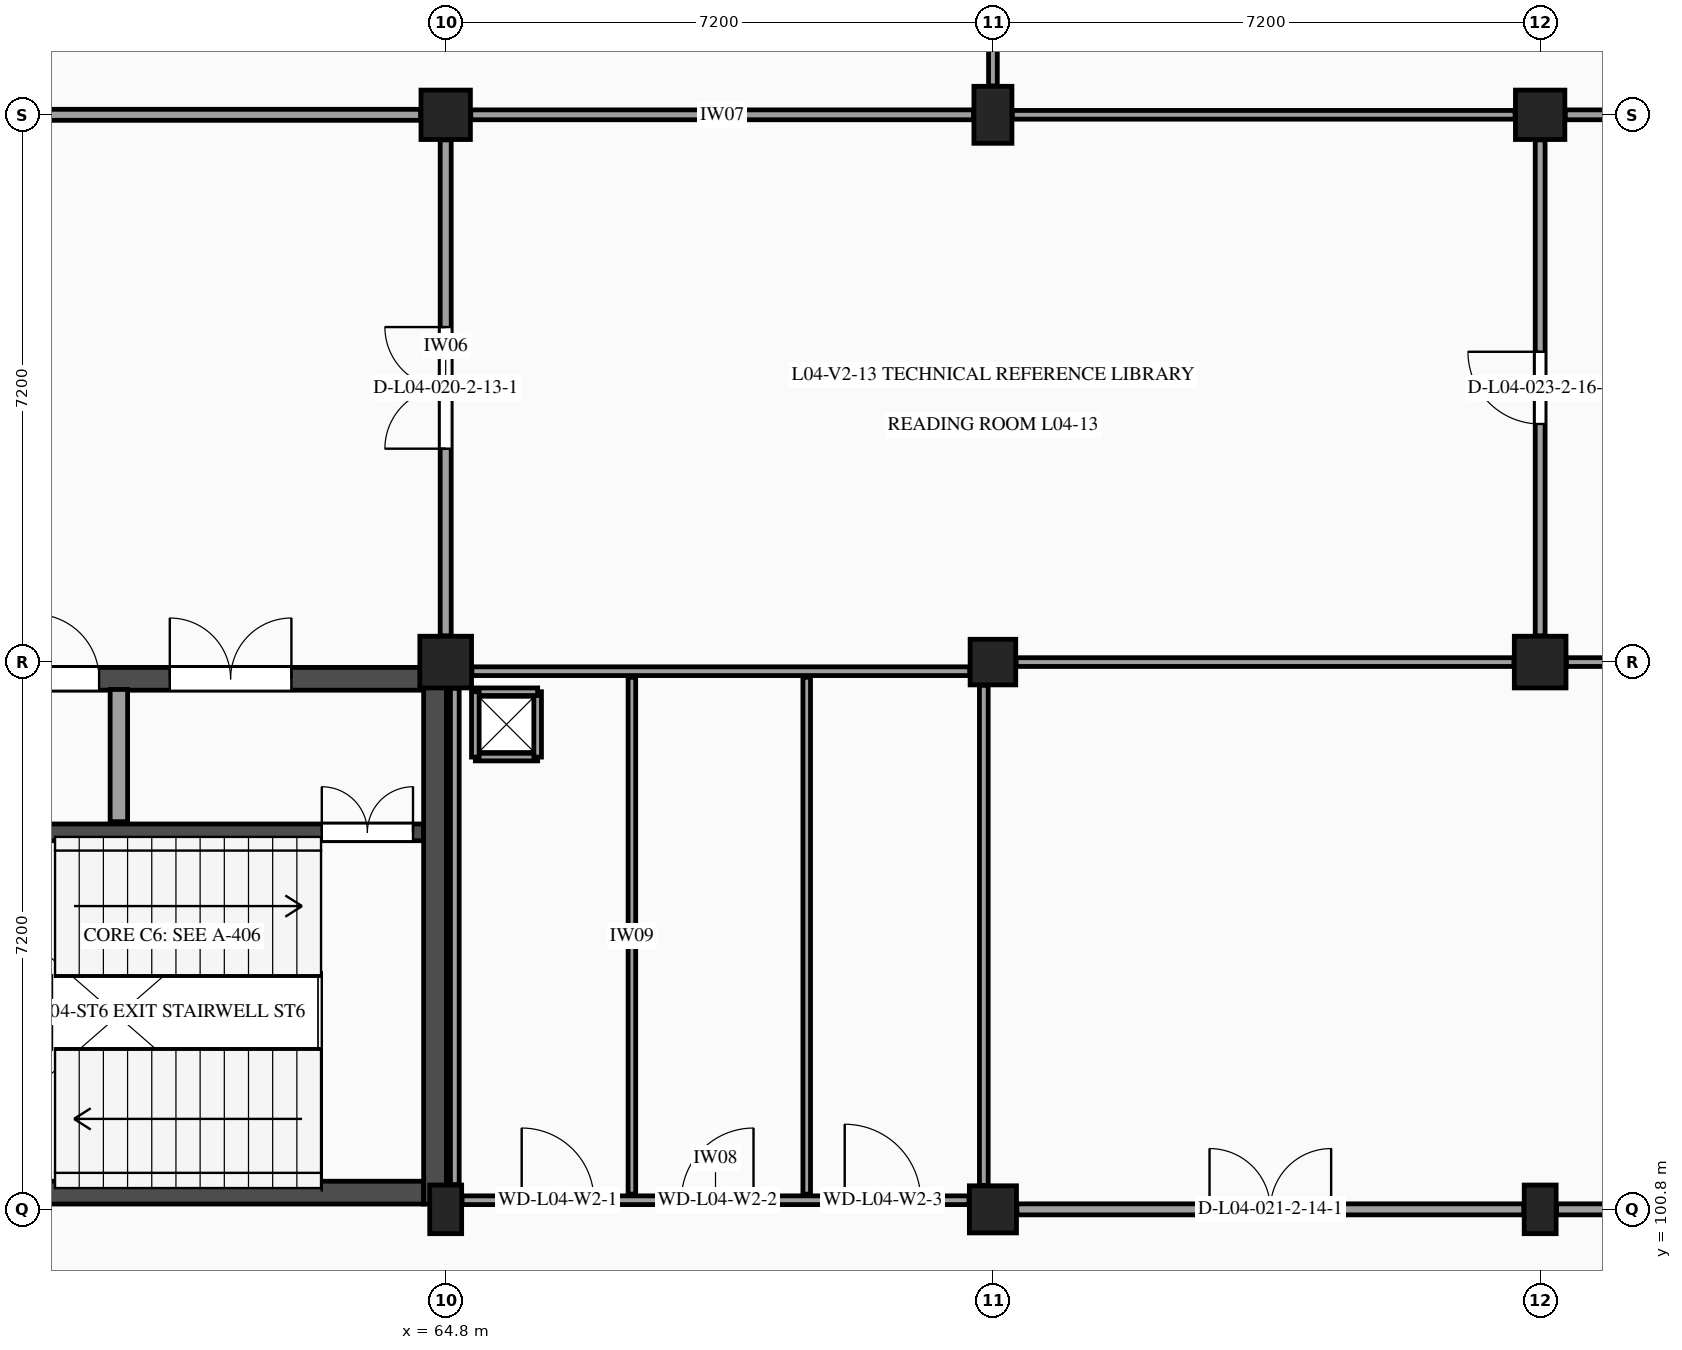
"""IFC4 building model, lengths in metres.
Left out: names, types, materials, properties, quantities, classifications, styles, units other than length and angle.
Written with IfcOpenShell. Run it as: python <this file> out.ifc"""

import sys

from ifc_helpers import new_model, si_unit, direction, frame, frame_2d, origin, origin_2d, place, context, subcontext, project, spatial, rectangle, extrude, element, fill, save


model = new_model("IFC4")
c1 = context("Model", 3, precision=1e-05, world=origin(), true_north=direction((0.0, 1.0)))
c2 = subcontext(c1, "Body", "Model", "MODEL_VIEW")
j1 = project(units=[si_unit("LENGTHUNIT", "METRE"), si_unit("PLANEANGLEUNIT", "RADIAN")], contexts=[c1])
p1 = place(None, origin())
s1 = spatial("IfcSite", under=j1, at=p1, CompositionType="ELEMENT")
p2 = place(p1, origin())
s2 = spatial("IfcBuilding", under=s1, at=p2, CompositionType="ELEMENT")
p3 = place(p2, frame((0.0, 0.0, 18.6)))
s3 = spatial("IfcBuildingStorey", under=s2, at=p3, CompositionType="ELEMENT", Elevation=18.6)
p4 = place(p3, frame((64.8, 100.8, 0.0), z_axis=(0.0, 0.0, 1.0), x_axis=(1.0, 0.0, 0.0)))
e1 = element("IfcColumn", 1, at=p4, inside=s3, PredefinedType="PILASTER", context=c2, shape_type="SweptSolid", body=[
    extrude(rectangle(XDim=0.42, YDim=0.64, at=origin_2d()), origin(), (0.0, 0.0, 1.0), 4.2),
])
p5 = place(p3, frame((64.8, 108.0, 0.0), z_axis=(0.0, 0.0, 1.0), x_axis=(1.0, 0.0, 0.0)))
e2 = element("IfcColumn", 2, at=p5, inside=s3, PredefinedType="COLUMN", context=c2, shape_type="SweptSolid", body=[
    extrude(rectangle(XDim=0.68, YDim=0.68, at=origin_2d()), origin(), (0.0, 0.0, 1.0), 4.2),
])
p6 = place(p3, frame((64.8, 115.2, 0.0), z_axis=(0.0, 0.0, 1.0), x_axis=(1.0, 0.0, 0.0)))
e3 = element("IfcColumn", 3, at=p6, inside=s3, PredefinedType="COLUMN", context=c2, shape_type="SweptSolid", body=[
    extrude(rectangle(XDim=0.65, YDim=0.65, at=origin_2d()), origin(), (0.0, 0.0, 1.0), 4.2),
])
p7 = place(p3, frame((72.0, 100.8, 0.0), z_axis=(0.0, 0.0, 1.0), x_axis=(1.0, 0.0, 0.0)))
e4 = element("IfcColumn", 4, at=p7, inside=s3, PredefinedType="COLUMN", context=c2, shape_type="SweptSolid", body=[
    extrude(rectangle(XDim=0.62, YDim=0.62, at=origin_2d()), origin(), (0.0, 0.0, 1.0), 4.2),
])
p8 = place(p3, frame((72.0, 108.0, 0.0), z_axis=(0.0, 0.0, 1.0), x_axis=(1.0, 0.0, 0.0)))
e5 = element("IfcColumn", 5, at=p8, inside=s3, PredefinedType="COLUMN", context=c2, shape_type="SweptSolid", body=[
    extrude(rectangle(XDim=0.6, YDim=0.6, at=origin_2d()), origin(), (0.0, 0.0, 1.0), 4.2),
])
p9 = place(p3, frame((72.0, 115.2, 0.0), z_axis=(0.0, 0.0, 1.0), x_axis=(1.0, 0.0, 0.0)))
e6 = element("IfcColumn", 6, at=p9, inside=s3, PredefinedType="COLUMN", context=c2, shape_type="SweptSolid", body=[
    extrude(rectangle(XDim=0.5, YDim=0.75, at=origin_2d()), origin(), (0.0, 0.0, 1.0), 4.2),
])
p10 = place(p3, frame((79.2, 100.8, 0.0), z_axis=(0.0, 0.0, 1.0), x_axis=(1.0, 0.0, 0.0)))
e7 = element("IfcColumn", 7, at=p10, inside=s3, PredefinedType="PILASTER", context=c2, shape_type="SweptSolid", body=[
    extrude(rectangle(XDim=0.42, YDim=0.64, at=origin_2d()), origin(), (0.0, 0.0, 1.0), 4.2),
])
p11 = place(p3, frame((79.2, 108.0, 0.0), z_axis=(0.0, 0.0, 1.0), x_axis=(1.0, 0.0, 0.0)))
e8 = element("IfcColumn", 8, at=p11, inside=s3, PredefinedType="COLUMN", context=c2, shape_type="SweptSolid", body=[
    extrude(rectangle(XDim=0.68, YDim=0.68, at=origin_2d()), origin(), (0.0, 0.0, 1.0), 4.2),
])
p12 = place(p3, frame((79.2, 115.2, 0.0), z_axis=(0.0, 0.0, 1.0), x_axis=(1.0, 0.0, 0.0)))
e9 = element("IfcColumn", 9, at=p12, inside=s3, PredefinedType="COLUMN", context=c2, shape_type="SweptSolid", body=[
    extrude(rectangle(XDim=0.65, YDim=0.65, at=origin_2d()), origin(), (0.0, 0.0, 1.0), 4.2),
])
p13 = place(p3, frame((57.97, 101.02, 0.0), z_axis=(0.0, 0.0, 1.0), x_axis=(1.0, 0.0, 0.0)))
e10 = element("IfcWall", 10, at=p13, inside=s3, PredefinedType="SHEAR", context=c2, shape_type="SweptSolid", body=[
    extrude(rectangle(XDim=6.54, YDim=0.3, at=frame_2d((3.27, 0.0))), origin(), (0.0, 0.0, 1.0), 3.955),
])
p14 = place(p3, frame((57.97, 107.78, 0.0), z_axis=(0.0, 0.0, 1.0), x_axis=(1.0, 0.0, 0.0)))
e11 = element("IfcWall", 11, at=p14, inside=s3, PredefinedType="SHEAR", context=c2, shape_type="SweptSolid", body=[
    extrude(rectangle(XDim=6.54, YDim=0.3, at=frame_2d((3.27, 0.0))), origin(), (0.0, 0.0, 1.0), 3.955),
])
p15 = place(p14, frame((1.42, 0.0, 0.0)))
e12 = element("IfcOpeningElement", 12, at=p15, cuts=e11, PredefinedType="OPENING", context=c2, shape_type="SweptSolid", body=[
    extrude(rectangle(XDim=0.85, YDim=2.1, at=frame_2d((0.425, 1.05))), frame((0.0, 0.16, 0.0), z_axis=(0.0, -1.0, 0.0), x_axis=(1.0, 0.0, 0.0)), (0.0, 0.0, 1.0), 0.32),
])
p16 = place(p14, frame((3.2, 0.0, 0.0)))
e13 = element("IfcOpeningElement", 13, at=p16, cuts=e11, PredefinedType="OPENING", context=c2, shape_type="SweptSolid", body=[
    extrude(rectangle(XDim=1.6, YDim=2.2, at=frame_2d((0.8, 1.1))), frame((0.0, 0.16, 0.0), z_axis=(0.0, -1.0, 0.0), x_axis=(1.0, 0.0, 0.0)), (0.0, 0.0, 1.0), 0.32),
])
p17 = place(p3, frame((57.97, 105.76, 0.0), z_axis=(0.0, 0.0, 1.0), x_axis=(1.0, 0.0, 0.0)))
e14 = element("IfcWall", 14, at=p17, inside=s3, PredefinedType="SHEAR", context=c2, shape_type="SweptSolid", body=[
    extrude(rectangle(XDim=6.54, YDim=0.22, at=frame_2d((3.27, 0.0))), origin(), (0.0, 0.0, 1.0), 3.955),
])
p18 = place(p17, frame((5.2, 0.0, 0.0)))
e15 = element("IfcOpeningElement", 15, at=p18, cuts=e14, PredefinedType="OPENING", context=c2, shape_type="SweptSolid", body=[
    extrude(rectangle(XDim=1.2, YDim=2.2, at=frame_2d((0.6, 1.1))), frame((0.0, 0.12, 0.0), z_axis=(0.0, -1.0, 0.0), x_axis=(1.0, 0.0, 0.0)), (0.0, 0.0, 1.0), 0.24),
])
p19 = place(p3, frame((60.5, 105.9, 0.0), z_axis=(0.0, 0.0, 1.0), x_axis=(0.0, 1.0, 0.0)))
e16 = element("IfcWall", 16, at=p19, inside=s3, PredefinedType="PARTITIONING", context=c2, shape_type="SweptSolid", body=[
    extrude(rectangle(XDim=1.74, YDim=0.23, at=frame_2d((0.87, 0.0))), origin(), (0.0, 0.0, 1.0), 3.955),
])
p20 = place(p3, frame((64.66, 100.87, 0.0), z_axis=(0.0, 0.0, 1.0), x_axis=(0.0, 1.0, 0.0)))
e17 = element("IfcWall", 17, at=p20, inside=s3, PredefinedType="SHEAR", context=c2, shape_type="SweptSolid", body=[
    extrude(rectangle(XDim=7.06, YDim=0.3, at=frame_2d((3.53, 0.0))), origin(), (0.0, 0.0, 1.0), 3.955),
])
p21 = place(p3, frame((65.015, 100.92, 0.0), z_axis=(0.0, 0.0, 1.0), x_axis=(1.0, 0.0, 0.0)))
e18 = element("IfcWall", 18, at=p21, inside=s3, PredefinedType="PARTITIONING", context=c2, shape_type="SweptSolid", body=[
    extrude(rectangle(XDim=6.67, YDim=0.115, at=frame_2d((3.335, 0.0))), origin(), (0.0, 0.0, 1.0), 3.23),
])
p22 = place(p21, frame((0.785, 0.0, 0.0)))
e19 = element("IfcOpeningElement", 19, at=p22, cuts=e18, PredefinedType="OPENING", context=c2, shape_type="SweptSolid", body=[
    extrude(rectangle(XDim=0.95, YDim=2.1, at=frame_2d((0.475, 1.05))), frame((0.0, 0.067, 0.0), z_axis=(0.0, -1.0, 0.0), x_axis=(1.0, 0.0, 0.0)), (0.0, 0.0, 1.0), 0.135),
])
p23 = place(p21, frame((2.885, 0.0, 0.0)))
e20 = element("IfcOpeningElement", 20, at=p23, cuts=e18, PredefinedType="OPENING", context=c2, shape_type="SweptSolid", body=[
    extrude(rectangle(XDim=0.95, YDim=2.1, at=frame_2d((0.475, 1.05))), frame((0.0, 0.067, 0.0), z_axis=(0.0, -1.0, 0.0), x_axis=(1.0, 0.0, 0.0)), (0.0, 0.0, 1.0), 0.135),
])
p24 = place(p21, frame((5.035, 0.0, 0.0)))
e21 = element("IfcOpeningElement", 21, at=p24, cuts=e18, PredefinedType="OPENING", context=c2, shape_type="SweptSolid", body=[
    extrude(rectangle(XDim=1.0, YDim=2.15, at=frame_2d((0.5, 1.075))), frame((0.0, 0.067, 0.0), z_axis=(0.0, -1.0, 0.0), x_axis=(1.0, 0.0, 0.0)), (0.0, 0.0, 1.0), 0.135),
])
p25 = place(p3, frame((65.145, 107.88, 0.0), z_axis=(0.0, 0.0, 1.0), x_axis=(1.0, 0.0, 0.0)))
e22 = element("IfcWall", 22, at=p25, inside=s3, PredefinedType="PARTITIONING", context=c2, shape_type="SweptSolid", body=[
    extrude(rectangle(XDim=6.55, YDim=0.115, at=frame_2d((3.275, 0.0))), origin(), (0.0, 0.0, 1.0), 3.23),
])
p26 = place(p3, frame((64.92, 101.125, 0.0), z_axis=(0.0, 0.0, 1.0), x_axis=(0.0, 1.0, 0.0)))
e23 = element("IfcWall", 23, at=p26, inside=s3, PredefinedType="PARTITIONING", context=c2, shape_type="SweptSolid", body=[
    extrude(rectangle(XDim=6.53, YDim=0.115, at=frame_2d((3.265, 0.0))), origin(), (0.0, 0.0, 1.0), 3.26),
])
p27 = place(p3, frame((71.88, 101.115, 0.0), z_axis=(0.0, 0.0, 1.0), x_axis=(0.0, 1.0, 0.0)))
e24 = element("IfcWall", 24, at=p27, inside=s3, PredefinedType="PARTITIONING", context=c2, shape_type="SweptSolid", body=[
    extrude(rectangle(XDim=6.58, YDim=0.115, at=frame_2d((3.29, 0.0))), origin(), (0.0, 0.0, 1.0), 3.24),
])
for number, where, z_axis, x_axis in (
    (25, (67.25, 101.0, 0.0), (0.0, 0.0, 1.0), (0.0, 1.0, 0.0)),
    (26, (69.55, 101.0, 0.0), (0.0, 0.0, 1.0), (0.0, 1.0, 0.0)),
):
    element("IfcWall", number, at=place(p3, frame(where, z_axis=z_axis, x_axis=x_axis)), inside=s3, PredefinedType="PARTITIONING", context=c2, shape_type="SweptSolid", body=[
        extrude(rectangle(XDim=6.8, YDim=0.1, at=frame_2d((3.4, 0.0))), origin(), (0.0, 0.0, 1.0), 3.955),
    ])
p28 = place(p3, frame((65.19, 106.75, 0.0), z_axis=(0.0, 0.0, 1.0), x_axis=(1.0, 0.0, 0.0)))
e27 = element("IfcWall", 27, at=p28, inside=s3, PredefinedType="PARTITIONING", context=c2, shape_type="SweptSolid", body=[
    extrude(rectangle(XDim=0.82, YDim=0.1, at=frame_2d((0.41, 0.0))), origin(), (0.0, 0.0, 1.0), 3.955),
])
p29 = place(p3, frame((66.01, 106.75, 0.0), z_axis=(0.0, 0.0, 1.0), x_axis=(0.0, 1.0, 0.0)))
e28 = element("IfcWall", 28, at=p29, inside=s3, PredefinedType="PARTITIONING", context=c2, shape_type="SweptSolid", body=[
    extrude(rectangle(XDim=0.86, YDim=0.1, at=frame_2d((0.43, 0.0))), origin(), (0.0, 0.0, 1.0), 3.955),
])
p30 = place(p3, frame((66.01, 107.61, 0.0), z_axis=(0.0, 0.0, 1.0), x_axis=(-1.0, 0.0, 0.0)))
e29 = element("IfcWall", 29, at=p30, inside=s3, PredefinedType="PARTITIONING", context=c2, shape_type="SweptSolid", body=[
    extrude(rectangle(XDim=0.82, YDim=0.1, at=frame_2d((0.41, 0.0))), origin(), (0.0, 0.0, 1.0), 3.955),
])
p31 = place(p3, frame((65.19, 107.61, 0.0), z_axis=(0.0, 0.0, 1.0), x_axis=(0.0, -1.0, 0.0)))
e30 = element("IfcWall", 30, at=p31, inside=s3, PredefinedType="PARTITIONING", context=c2, shape_type="SweptSolid", body=[
    extrude(rectangle(XDim=0.86, YDim=0.1, at=frame_2d((0.43, 0.0))), origin(), (0.0, 0.0, 1.0), 3.955),
])
p32 = place(p3, frame((64.8, 108.345, 0.0), z_axis=(0.0, 0.0, 1.0), x_axis=(0.0, 1.0, 0.0)))
e31 = element("IfcWall", 31, at=p32, inside=s3, PredefinedType="PARTITIONING", context=c2, shape_type="SweptSolid", body=[
    extrude(rectangle(XDim=6.525, YDim=0.145, at=frame_2d((3.263, 0.0))), origin(), (0.0, 0.0, 1.0), 3.26),
])
p33 = place(p32, frame((2.462, 0.0, 0.0)))
e32 = element("IfcOpeningElement", 32, at=p33, cuts=e31, PredefinedType="OPENING", context=c2, shape_type="SweptSolid", body=[
    extrude(rectangle(XDim=1.6, YDim=2.2, at=frame_2d((0.8, 1.1))), frame((0.0, 0.083, 0.0), z_axis=(0.0, -1.0, 0.0), x_axis=(1.0, 0.0, 0.0)), (0.0, 0.0, 1.0), 0.165),
])
p34 = place(p3, frame((57.855, 115.2, 0.0), z_axis=(0.0, 0.0, 1.0), x_axis=(1.0, 0.0, 0.0)))
e33 = element("IfcWall", 33, at=p34, inside=s3, PredefinedType="PARTITIONING", context=c2, shape_type="SweptSolid", body=[
    extrude(rectangle(XDim=6.615, YDim=0.145, at=frame_2d((3.308, 0.0))), origin(), (0.0, 0.0, 1.0), 3.215),
])
p35 = place(p3, frame((65.13, 115.2, 0.0), z_axis=(0.0, 0.0, 1.0), x_axis=(1.0, 0.0, 0.0)))
e34 = element("IfcWall", 34, at=p35, inside=s3, PredefinedType="PARTITIONING", context=c2, shape_type="SweptSolid", body=[
    extrude(rectangle(XDim=6.615, YDim=0.13, at=frame_2d((3.308, 0.0))), origin(), (0.0, 0.0, 1.0), 3.23),
])
p36 = place(p3, frame((72.0, 115.58, 0.0), z_axis=(0.0, 0.0, 1.0), x_axis=(0.0, 1.0, 0.0)))
e35 = element("IfcWall", 35, at=p36, inside=s3, PredefinedType="PARTITIONING", context=c2, shape_type="SweptSolid", body=[
    extrude(rectangle(XDim=6.495, YDim=0.115, at=frame_2d((3.248, 0.0))), origin(), (0.0, 0.0, 1.0), 3.305),
])
p37 = place(p36, frame((2.448, 0.0, 0.0)))
e36 = element("IfcOpeningElement", 36, at=p37, cuts=e35, PredefinedType="OPENING", context=c2, shape_type="SweptSolid", body=[
    extrude(rectangle(XDim=1.6, YDim=2.2, at=frame_2d((0.8, 1.1))), frame((0.0, 0.067, 0.0), z_axis=(0.0, -1.0, 0.0), x_axis=(1.0, 0.0, 0.0)), (0.0, 0.0, 1.0), 0.135),
])
p38 = place(p3, frame((72.315, 100.8, 0.0), z_axis=(0.0, 0.0, 1.0), x_axis=(1.0, 0.0, 0.0)))
e37 = element("IfcWall", 37, at=p38, inside=s3, PredefinedType="PARTITIONING", context=c2, shape_type="SweptSolid", body=[
    extrude(rectangle(XDim=6.67, YDim=0.145, at=frame_2d((3.335, 0.0))), origin(), (0.0, 0.0, 1.0), 3.215),
])
p39 = place(p38, frame((2.535, 0.0, 0.0)))
e38 = element("IfcOpeningElement", 38, at=p39, cuts=e37, PredefinedType="OPENING", context=c2, shape_type="SweptSolid", body=[
    extrude(rectangle(XDim=1.6, YDim=2.2, at=frame_2d((0.8, 1.1))), frame((0.0, 0.083, 0.0), z_axis=(0.0, -1.0, 0.0), x_axis=(1.0, 0.0, 0.0)), (0.0, 0.0, 1.0), 0.165),
])
p40 = place(p3, frame((72.305, 108.0, 0.0), z_axis=(0.0, 0.0, 1.0), x_axis=(1.0, 0.0, 0.0)))
e39 = element("IfcWall", 39, at=p40, inside=s3, PredefinedType="PARTITIONING", context=c2, shape_type="SweptSolid", body=[
    extrude(rectangle(XDim=6.55, YDim=0.115, at=frame_2d((3.275, 0.0))), origin(), (0.0, 0.0, 1.0), 3.215),
])
p41 = place(p3, frame((79.2, 108.345, 0.0), z_axis=(0.0, 0.0, 1.0), x_axis=(0.0, 1.0, 0.0)))
e40 = element("IfcWall", 40, at=p41, inside=s3, PredefinedType="PARTITIONING", context=c2, shape_type="SweptSolid", body=[
    extrude(rectangle(XDim=6.525, YDim=0.13, at=frame_2d((3.263, 0.0))), origin(), (0.0, 0.0, 1.0), 3.24),
])
p42 = place(p41, frame((2.788, 0.0, 0.0)))
e41 = element("IfcOpeningElement", 41, at=p42, cuts=e40, PredefinedType="OPENING", context=c2, shape_type="SweptSolid", body=[
    extrude(rectangle(XDim=0.95, YDim=2.15, at=frame_2d((0.475, 1.075))), frame((0.0, 0.075, 0.0), z_axis=(0.0, -1.0, 0.0), x_axis=(1.0, 0.0, 0.0)), (0.0, 0.0, 1.0), 0.15),
])
p43 = place(p3, frame((72.255, 115.2, 0.0), z_axis=(0.0, 0.0, 1.0), x_axis=(1.0, 0.0, 0.0)))
e42 = element("IfcWall", 42, at=p43, inside=s3, PredefinedType="PARTITIONING", context=c2, shape_type="SweptSolid", body=[
    extrude(rectangle(XDim=6.615, YDim=0.115, at=frame_2d((3.308, 0.0))), origin(), (0.0, 0.0, 1.0), 3.215),
])
p44 = place(p3, frame((79.415, 100.8, 0.0), z_axis=(0.0, 0.0, 1.0), x_axis=(1.0, 0.0, 0.0)))
e43 = element("IfcWall", 43, at=p44, inside=s3, PredefinedType="PARTITIONING", context=c2, shape_type="SweptSolid", body=[
    extrude(rectangle(XDim=6.67, YDim=0.145, at=frame_2d((3.335, 0.0))), origin(), (0.0, 0.0, 1.0), 3.235),
])
p45 = place(p3, frame((79.545, 108.0, 0.0), z_axis=(0.0, 0.0, 1.0), x_axis=(1.0, 0.0, 0.0)))
e44 = element("IfcWall", 44, at=p45, inside=s3, PredefinedType="PARTITIONING", context=c2, shape_type="SweptSolid", body=[
    extrude(rectangle(XDim=6.55, YDim=0.115, at=frame_2d((3.275, 0.0))), origin(), (0.0, 0.0, 1.0), 3.235),
])
p46 = place(p3, frame((79.53, 115.2, 0.0), z_axis=(0.0, 0.0, 1.0), x_axis=(1.0, 0.0, 0.0)))
e45 = element("IfcWall", 45, at=p46, inside=s3, PredefinedType="PARTITIONING", context=c2, shape_type="SweptSolid", body=[
    extrude(rectangle(XDim=6.615, YDim=0.13, at=frame_2d((3.308, 0.0))), origin(), (0.0, 0.0, 1.0), 3.235),
])
p47 = place(p15, origin())
e46 = element("IfcDoor", 46, at=p47, inside=s3, OperationType="SINGLE_SWING_LEFT", PredefinedType="DOOR", context=c2, shape_type="SweptSolid", body=[
    extrude(rectangle(XDim=0.85, YDim=2.1, at=frame_2d((0.425, 1.05))), frame((0.0, 0.025, 0.0), z_axis=(0.0, -1.0, 0.0), x_axis=(1.0, 0.0, 0.0)), (0.0, 0.0, 1.0), 0.05),
])
fill(e12, e46)
p48 = place(p18, origin())
e47 = element("IfcDoor", 47, at=p48, inside=s3, OperationType="DOUBLE_DOOR_SINGLE_SWING", PredefinedType="DOOR", context=c2, shape_type="SweptSolid", body=[
    extrude(rectangle(XDim=1.2, YDim=2.2, at=frame_2d((0.6, 1.1))), frame((0.0, 0.025, 0.0), z_axis=(0.0, -1.0, 0.0), x_axis=(1.0, 0.0, 0.0)), (0.0, 0.0, 1.0), 0.05),
])
fill(e15, e47)
p49 = place(p16, frame((1.6, 0.0, 0.0), z_axis=(0.0, 0.0, 1.0), x_axis=(-1.0, 0.0, 0.0)))
e48 = element("IfcDoor", 48, at=p49, inside=s3, OperationType="DOUBLE_DOOR_SINGLE_SWING", PredefinedType="DOOR", context=c2, shape_type="SweptSolid", body=[
    extrude(rectangle(XDim=1.6, YDim=2.2, at=frame_2d((0.8, 1.1))), frame((0.0, 0.025, 0.0), z_axis=(0.0, -1.0, 0.0), x_axis=(1.0, 0.0, 0.0)), (0.0, 0.0, 1.0), 0.05),
])
fill(e13, e48)
p50 = place(p22, origin())
e49 = element("IfcDoor", 49, at=p50, inside=s3, OperationType="SINGLE_SWING_LEFT", PredefinedType="DOOR", context=c2, shape_type="SweptSolid", body=[
    extrude(rectangle(XDim=0.95, YDim=2.1, at=frame_2d((0.475, 1.05))), frame((0.0, 0.025, 0.0), z_axis=(0.0, -1.0, 0.0), x_axis=(1.0, 0.0, 0.0)), (0.0, 0.0, 1.0), 0.05),
])
fill(e19, e49)
p51 = place(p23, origin())
e50 = element("IfcDoor", 50, at=p51, inside=s3, OperationType="SINGLE_SWING_RIGHT", PredefinedType="DOOR", context=c2, shape_type="SweptSolid", body=[
    extrude(rectangle(XDim=0.95, YDim=2.1, at=frame_2d((0.475, 1.05))), frame((0.0, 0.025, 0.0), z_axis=(0.0, -1.0, 0.0), x_axis=(1.0, 0.0, 0.0)), (0.0, 0.0, 1.0), 0.05),
])
fill(e20, e50)
p52 = place(p24, origin())
e51 = element("IfcDoor", 51, at=p52, inside=s3, OperationType="SINGLE_SWING_LEFT", PredefinedType="DOOR", context=c2, shape_type="SweptSolid", body=[
    extrude(rectangle(XDim=1.0, YDim=2.15, at=frame_2d((0.5, 1.075))), frame((0.0, 0.025, 0.0), z_axis=(0.0, -1.0, 0.0), x_axis=(1.0, 0.0, 0.0)), (0.0, 0.0, 1.0), 0.05),
])
fill(e21, e51)
p53 = place(p33, origin())
e52 = element("IfcDoor", 52, at=p53, inside=s3, OperationType="DOUBLE_DOOR_SINGLE_SWING", PredefinedType="DOOR", context=c2, shape_type="SweptSolid", body=[
    extrude(rectangle(XDim=1.6, YDim=2.2, at=frame_2d((0.8, 1.1))), frame((0.0, 0.025, 0.0), z_axis=(0.0, -1.0, 0.0), x_axis=(1.0, 0.0, 0.0)), (0.0, 0.0, 1.0), 0.05),
])
fill(e32, e52)
p54 = place(p39, origin())
e53 = element("IfcDoor", 53, at=p54, inside=s3, OperationType="DOUBLE_DOOR_SINGLE_SWING", PredefinedType="DOOR", context=c2, shape_type="SweptSolid", body=[
    extrude(rectangle(XDim=1.6, YDim=2.2, at=frame_2d((0.8, 1.1))), frame((0.0, 0.025, 0.0), z_axis=(0.0, -1.0, 0.0), x_axis=(1.0, 0.0, 0.0)), (0.0, 0.0, 1.0), 0.05),
])
fill(e38, e53)
p55 = place(p42, origin())
e54 = element("IfcDoor", 54, at=p55, inside=s3, OperationType="SINGLE_SWING_RIGHT", PredefinedType="DOOR", context=c2, shape_type="SweptSolid", body=[
    extrude(rectangle(XDim=0.95, YDim=2.15, at=frame_2d((0.475, 1.075))), frame((0.0, 0.025, 0.0), z_axis=(0.0, -1.0, 0.0), x_axis=(1.0, 0.0, 0.0)), (0.0, 0.0, 1.0), 0.05),
])
fill(e41, e54)
save(model, sys.argv[1])
